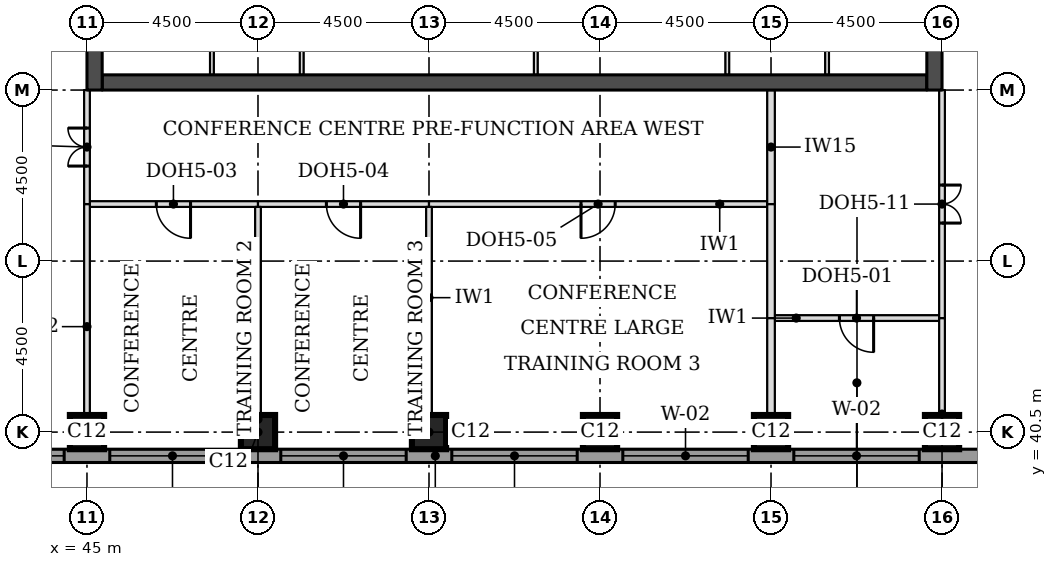
"""IFC4 building model, lengths in metres.
Left out: names, types, materials, properties, quantities, classifications, styles, units other than length and angle.
Written with IfcOpenShell. Run it as: python <this file> out.ifc"""

import sys

from ifc_helpers import new_model, si_unit, direction, frame, frame_2d, origin, origin_2d, place, context, subcontext, project, spatial, rectangle, extrude, element, fill, save


model = new_model("IFC4")
c1 = context("Model", 3, precision=1e-05, world=origin(), true_north=direction((0.0, 1.0)))
c2 = subcontext(c1, "Body", "Model", "MODEL_VIEW")
j1 = project(units=[si_unit("LENGTHUNIT", "METRE"), si_unit("PLANEANGLEUNIT", "RADIAN")], contexts=[c1])
p1 = place(None, origin())
s1 = spatial("IfcSite", under=j1, at=p1, CompositionType="ELEMENT")
p2 = place(p1, origin())
s2 = spatial("IfcBuilding", under=s1, at=p2, CompositionType="ELEMENT")
p3 = place(p2, frame((0.0, 0.0, 177.3)))
s3 = spatial("IfcBuildingStorey", under=s2, at=p3, CompositionType="ELEMENT", Elevation=177.3)
for number, where, z_axis, x_axis in (
    (1, (45.0, 40.5, 0.0), (0.0, 0.0, 1.0), (1.0, 0.0, 0.0)),
    (2, (49.5, 40.5, 0.0), (0.0, 0.0, 1.0), (1.0, 0.0, 0.0)),
    (3, (54.0, 40.5, 0.0), (0.0, 0.0, 1.0), (1.0, 0.0, 0.0)),
    (4, (58.5, 40.5, 0.0), (0.0, 0.0, 1.0), (1.0, 0.0, 0.0)),
    (5, (63.0, 40.5, 0.0), (0.0, 0.0, 1.0), (1.0, 0.0, 0.0)),
    (6, (67.5, 40.5, 0.0), (0.0, 0.0, 1.0), (1.0, 0.0, 0.0)),
):
    element("IfcColumn", number, at=place(p3, frame(where, z_axis=z_axis, x_axis=x_axis)), inside=s3, PredefinedType="COLUMN", context=c2, shape_type="SweptSolid", body=[
        extrude(rectangle(XDim=0.9, YDim=0.9, at=origin_2d()), origin(), (0.0, 0.0, 1.0), 3.7),
    ])
p4 = place(p3, frame((45.4, 49.7, 0.0), z_axis=(0.0, 0.0, 1.0), x_axis=(1.0, 0.0, 0.0)))
e7 = element("IfcWall", 7, at=p4, inside=s3, PredefinedType="SHEAR", context=c2, shape_type="SweptSolid", body=[
    extrude(rectangle(XDim=21.7, YDim=0.4, at=frame_2d((10.85, 0.0))), origin(), (0.0, 0.0, 1.0), 3.7),
])
p5 = place(p3, frame((45.2, 49.5, 0.0), z_axis=(0.0, 0.0, 1.0), x_axis=(0.0, 1.0, 0.0)))
e8 = element("IfcWall", 8, at=p5, inside=s3, PredefinedType="SHEAR", context=c2, shape_type="SweptSolid", body=[
    extrude(rectangle(XDim=22.5, YDim=0.4, at=frame_2d((11.25, 0.0))), origin(), (0.0, 0.0, 1.0), 3.7),
])
p6 = place(p5, frame((4.2, 0.0, 0.0)))
e9 = element("IfcOpeningElement", 9, at=p6, cuts=e8, PredefinedType="OPENING", context=c2, shape_type="SweptSolid", body=[
    extrude(rectangle(XDim=1.8, YDim=2.1, at=frame_2d((0.9, 1.05))), frame((0.0, 0.21, 0.0), z_axis=(0.0, -1.0, 0.0), x_axis=(1.0, 0.0, 0.0)), (0.0, 0.0, 1.0), 0.42),
])
p7 = place(p5, frame((6.9, 0.0, 0.0)))
e10 = element("IfcOpeningElement", 10, at=p7, cuts=e8, PredefinedType="OPENING", context=c2, shape_type="SweptSolid", body=[
    extrude(rectangle(XDim=1.1, YDim=2.1, at=frame_2d((0.55, 1.05))), frame((0.0, 0.21, 0.0), z_axis=(0.0, -1.0, 0.0), x_axis=(1.0, 0.0, 0.0)), (0.0, 0.0, 1.0), 0.42),
])
p8 = place(p5, frame((13.6, 0.0, 0.0)))
e11 = element("IfcOpeningElement", 11, at=p8, cuts=e8, PredefinedType="OPENING", context=c2, shape_type="SweptSolid", body=[
    extrude(rectangle(XDim=1.1, YDim=2.1, at=frame_2d((0.55, 1.05))), frame((0.0, 0.21, 0.0), z_axis=(0.0, -1.0, 0.0), x_axis=(1.0, 0.0, 0.0)), (0.0, 0.0, 1.0), 0.42),
])
p9 = place(p5, frame((16.5, 0.0, 0.0)))
e12 = element("IfcOpeningElement", 12, at=p9, cuts=e8, PredefinedType="OPENING", context=c2, shape_type="SweptSolid", body=[
    extrude(rectangle(XDim=1.8, YDim=2.1, at=frame_2d((0.9, 1.05))), frame((0.0, 0.21, 0.0), z_axis=(0.0, -1.0, 0.0), x_axis=(1.0, 0.0, 0.0)), (0.0, 0.0, 1.0), 0.42),
])
p10 = place(p3, frame((67.3, 49.5, 0.0), z_axis=(0.0, 0.0, 1.0), x_axis=(0.0, 1.0, 0.0)))
e13 = element("IfcWall", 13, at=p10, inside=s3, PredefinedType="SHEAR", context=c2, shape_type="SweptSolid", body=[
    extrude(rectangle(XDim=22.5, YDim=0.4, at=frame_2d((11.25, 0.0))), origin(), (0.0, 0.0, 1.0), 3.7),
])
p11 = place(p10, frame((4.2, 0.0, 0.0)))
e14 = element("IfcOpeningElement", 14, at=p11, cuts=e13, PredefinedType="OPENING", context=c2, shape_type="SweptSolid", body=[
    extrude(rectangle(XDim=1.8, YDim=2.1, at=frame_2d((0.9, 1.05))), frame((0.0, 0.21, 0.0), z_axis=(0.0, -1.0, 0.0), x_axis=(1.0, 0.0, 0.0)), (0.0, 0.0, 1.0), 0.42),
])
p12 = place(p10, frame((6.9, 0.0, 0.0)))
e15 = element("IfcOpeningElement", 15, at=p12, cuts=e13, PredefinedType="OPENING", context=c2, shape_type="SweptSolid", body=[
    extrude(rectangle(XDim=1.1, YDim=2.1, at=frame_2d((0.55, 1.05))), frame((0.0, 0.21, 0.0), z_axis=(0.0, -1.0, 0.0), x_axis=(1.0, 0.0, 0.0)), (0.0, 0.0, 1.0), 0.42),
])
p13 = place(p10, frame((13.6, 0.0, 0.0)))
e16 = element("IfcOpeningElement", 16, at=p13, cuts=e13, PredefinedType="OPENING", context=c2, shape_type="SweptSolid", body=[
    extrude(rectangle(XDim=1.1, YDim=2.1, at=frame_2d((0.55, 1.05))), frame((0.0, 0.21, 0.0), z_axis=(0.0, -1.0, 0.0), x_axis=(1.0, 0.0, 0.0)), (0.0, 0.0, 1.0), 0.42),
])
p14 = place(p10, frame((16.5, 0.0, 0.0)))
e17 = element("IfcOpeningElement", 17, at=p14, cuts=e13, PredefinedType="OPENING", context=c2, shape_type="SweptSolid", body=[
    extrude(rectangle(XDim=1.8, YDim=2.1, at=frame_2d((0.9, 1.05))), frame((0.0, 0.21, 0.0), z_axis=(0.0, -1.0, 0.0), x_axis=(1.0, 0.0, 0.0)), (0.0, 0.0, 1.0), 0.42),
])
p15 = place(p3, frame((36.0, 39.875, 0.0), z_axis=(0.0, 0.0, 1.0), x_axis=(1.0, 0.0, 0.0)))
e18 = element("IfcWall", 18, at=p15, inside=s3, PredefinedType="STANDARD", context=c2, shape_type="SweptSolid", body=[
    extrude(rectangle(XDim=36.331, YDim=0.35, at=frame_2d((18.166, 0.0))), origin(), (0.0, 0.0, 1.0), 3.525),
])
p16 = place(p15, frame((5.1, 0.0, 0.9)))
e19 = element("IfcOpeningElement", 19, at=p16, cuts=e18, PredefinedType="OPENING", context=c2, shape_type="SweptSolid", body=[
    extrude(rectangle(XDim=3.3, YDim=1.9, at=frame_2d((1.65, 0.95))), frame((0.0, 0.185, 0.0), z_axis=(0.0, -1.0, 0.0), x_axis=(1.0, 0.0, 0.0)), (0.0, 0.0, 1.0), 0.37),
])
p17 = place(p15, frame((9.6, 0.0, 0.9)))
e20 = element("IfcOpeningElement", 20, at=p17, cuts=e18, PredefinedType="OPENING", context=c2, shape_type="SweptSolid", body=[
    extrude(rectangle(XDim=3.3, YDim=1.9, at=frame_2d((1.65, 0.95))), frame((0.0, 0.185, 0.0), z_axis=(0.0, -1.0, 0.0), x_axis=(1.0, 0.0, 0.0)), (0.0, 0.0, 1.0), 0.37),
])
p18 = place(p15, frame((14.1, 0.0, 0.9)))
e21 = element("IfcOpeningElement", 21, at=p18, cuts=e18, PredefinedType="OPENING", context=c2, shape_type="SweptSolid", body=[
    extrude(rectangle(XDim=3.3, YDim=1.9, at=frame_2d((1.65, 0.95))), frame((0.0, 0.185, 0.0), z_axis=(0.0, -1.0, 0.0), x_axis=(1.0, 0.0, 0.0)), (0.0, 0.0, 1.0), 0.37),
])
p19 = place(p15, frame((18.6, 0.0, 0.9)))
e22 = element("IfcOpeningElement", 22, at=p19, cuts=e18, PredefinedType="OPENING", context=c2, shape_type="SweptSolid", body=[
    extrude(rectangle(XDim=3.3, YDim=1.9, at=frame_2d((1.65, 0.95))), frame((0.0, 0.185, 0.0), z_axis=(0.0, -1.0, 0.0), x_axis=(1.0, 0.0, 0.0)), (0.0, 0.0, 1.0), 0.37),
])
p20 = place(p15, frame((23.1, 0.0, 0.9)))
e23 = element("IfcOpeningElement", 23, at=p20, cuts=e18, PredefinedType="OPENING", context=c2, shape_type="SweptSolid", body=[
    extrude(rectangle(XDim=3.3, YDim=1.9, at=frame_2d((1.65, 0.95))), frame((0.0, 0.185, 0.0), z_axis=(0.0, -1.0, 0.0), x_axis=(1.0, 0.0, 0.0)), (0.0, 0.0, 1.0), 0.37),
])
p21 = place(p15, frame((27.6, 0.0, 0.9)))
e24 = element("IfcOpeningElement", 24, at=p21, cuts=e18, PredefinedType="OPENING", context=c2, shape_type="SweptSolid", body=[
    extrude(rectangle(XDim=3.3, YDim=1.9, at=frame_2d((1.65, 0.95))), frame((0.0, 0.185, 0.0), z_axis=(0.0, -1.0, 0.0), x_axis=(1.0, 0.0, 0.0)), (0.0, 0.0, 1.0), 0.37),
])
p22 = place(p3, frame((63.1, 43.5, 0.0), z_axis=(0.0, 0.0, 1.0), x_axis=(1.0, 0.0, 0.0)))
e25 = element("IfcWall", 25, at=p22, inside=s3, PredefinedType="PARTITIONING", context=c2, shape_type="SweptSolid", body=[
    extrude(rectangle(XDim=4.325, YDim=0.15, at=frame_2d((2.163, 0.0))), origin(), (0.0, 0.0, 1.0), 3.55),
])
p23 = place(p22, frame((1.7, 0.0, 0.0)))
e26 = element("IfcOpeningElement", 26, at=p23, cuts=e25, PredefinedType="OPENING", context=c2, shape_type="SweptSolid", body=[
    extrude(rectangle(XDim=0.9, YDim=2.1, at=frame_2d((0.45, 1.05))), frame((0.0, 0.085, 0.0), z_axis=(0.0, -1.0, 0.0), x_axis=(1.0, 0.0, 0.0)), (0.0, 0.0, 1.0), 0.17),
])
p24 = place(p3, frame((45.075, 46.5, 0.0), z_axis=(0.0, 0.0, 1.0), x_axis=(1.0, 0.0, 0.0)))
e27 = element("IfcWall", 27, at=p24, inside=s3, PredefinedType="PARTITIONING", context=c2, shape_type="SweptSolid", body=[
    extrude(rectangle(XDim=4.425, YDim=0.15, at=frame_2d((2.212, 0.0))), origin(), (0.0, 0.0, 1.0), 3.55),
])
p25 = place(p24, frame((1.75, 0.0, 0.0)))
e28 = element("IfcOpeningElement", 28, at=p25, cuts=e27, PredefinedType="OPENING", context=c2, shape_type="SweptSolid", body=[
    extrude(rectangle(XDim=0.9, YDim=2.1, at=frame_2d((0.45, 1.05))), frame((0.0, 0.085, 0.0), z_axis=(0.0, -1.0, 0.0), x_axis=(1.0, 0.0, 0.0)), (0.0, 0.0, 1.0), 0.17),
])
p26 = place(p3, frame((49.5, 46.5, 0.0), z_axis=(0.0, 0.0, 1.0), x_axis=(1.0, 0.0, 0.0)))
e29 = element("IfcWall", 29, at=p26, inside=s3, PredefinedType="PARTITIONING", context=c2, shape_type="SweptSolid", body=[
    extrude(rectangle(XDim=4.5, YDim=0.15, at=frame_2d((2.25, 0.0))), origin(), (0.0, 0.0, 1.0), 3.55),
])
p27 = place(p26, frame((1.8, 0.0, 0.0)))
e30 = element("IfcOpeningElement", 30, at=p27, cuts=e29, PredefinedType="OPENING", context=c2, shape_type="SweptSolid", body=[
    extrude(rectangle(XDim=0.9, YDim=2.1, at=frame_2d((0.45, 1.05))), frame((0.0, 0.085, 0.0), z_axis=(0.0, -1.0, 0.0), x_axis=(1.0, 0.0, 0.0)), (0.0, 0.0, 1.0), 0.17),
])
p28 = place(p3, frame((54.0, 46.5, 0.0), z_axis=(0.0, 0.0, 1.0), x_axis=(1.0, 0.0, 0.0)))
e31 = element("IfcWall", 31, at=p28, inside=s3, PredefinedType="PARTITIONING", context=c2, shape_type="SweptSolid", body=[
    extrude(rectangle(XDim=8.9, YDim=0.15, at=frame_2d((4.45, 0.0))), origin(), (0.0, 0.0, 1.0), 3.55),
])
p29 = place(p28, frame((4.0, 0.0, 0.0)))
e32 = element("IfcOpeningElement", 32, at=p29, cuts=e31, PredefinedType="OPENING", context=c2, shape_type="SweptSolid", body=[
    extrude(rectangle(XDim=0.9, YDim=2.1, at=frame_2d((0.45, 1.05))), frame((0.0, 0.085, 0.0), z_axis=(0.0, -1.0, 0.0), x_axis=(1.0, 0.0, 0.0)), (0.0, 0.0, 1.0), 0.17),
])
p30 = place(p3, frame((45.0, 40.05, 0.0), z_axis=(0.0, 0.0, 1.0), x_axis=(0.0, 1.0, 0.0)))
e33 = element("IfcWall", 33, at=p30, inside=s3, PredefinedType="PARTITIONING", context=c2, shape_type="SweptSolid", body=[
    extrude(rectangle(XDim=6.45, YDim=0.15, at=frame_2d((3.225, 0.0))), origin(), (0.0, 0.0, 1.0), 3.022),
])
for number, where, z_axis, x_axis in (
    (34, (49.5, 40.05, 0.0), (0.0, 0.0, 1.0), (0.0, 1.0, 0.0)),
    (35, (54.0, 40.05, 0.0), (0.0, 0.0, 1.0), (0.0, 1.0, 0.0)),
):
    element("IfcWall", number, at=place(p3, frame(where, z_axis=z_axis, x_axis=x_axis)), inside=s3, PredefinedType="PARTITIONING", context=c2, shape_type="SweptSolid", body=[
        extrude(rectangle(XDim=6.375, YDim=0.15, at=frame_2d((3.188, 0.0))), origin(), (0.0, 0.0, 1.0), 3.55),
    ])
p31 = place(p3, frame((63.0, 40.05, 0.0), z_axis=(0.0, 0.0, 1.0), x_axis=(0.0, 1.0, 0.0)))
e36 = element("IfcWall", 36, at=p31, inside=s3, PredefinedType="PARTITIONING", context=c2, shape_type="SweptSolid", body=[
    extrude(rectangle(XDim=3.45, YDim=0.2, at=frame_2d((1.725, 0.0))), origin(), (0.0, 0.0, 1.0), 3.55),
])
p32 = place(p3, frame((67.5, 40.05, 0.0), z_axis=(0.0, 0.0, 1.0), x_axis=(0.0, 1.0, 0.0)))
e37 = element("IfcWall", 37, at=p32, inside=s3, PredefinedType="PARTITIONING", context=c2, shape_type="SweptSolid", body=[
    extrude(rectangle(XDim=3.45, YDim=0.15, at=frame_2d((1.725, 0.0))), origin(), (0.0, 0.0, 1.0), 3.022),
])
p33 = place(p3, frame((63.0, 43.5, 0.0), z_axis=(0.0, 0.0, 1.0), x_axis=(0.0, 1.0, 0.0)))
e38 = element("IfcWall", 38, at=p33, inside=s3, PredefinedType="PARTITIONING", context=c2, shape_type="SweptSolid", body=[
    extrude(rectangle(XDim=3.0, YDim=0.2, at=frame_2d((1.5, 0.0))), origin(), (0.0, 0.0, 1.0), 3.55),
])
p34 = place(p3, frame((67.5, 43.5, 0.0), z_axis=(0.0, 0.0, 1.0), x_axis=(0.0, 1.0, 0.0)))
e39 = element("IfcWall", 39, at=p34, inside=s3, PredefinedType="PARTITIONING", context=c2, shape_type="SweptSolid", body=[
    extrude(rectangle(XDim=6.0, YDim=0.15, at=frame_2d((3.0, 0.0))), origin(), (0.0, 0.0, 1.0), 3.022),
])
p35 = place(p34, frame((2.5, 0.0, 0.0)))
e40 = element("IfcOpeningElement", 40, at=p35, cuts=e39, PredefinedType="OPENING", context=c2, shape_type="SweptSolid", body=[
    extrude(rectangle(XDim=1.0, YDim=2.1, at=frame_2d((0.5, 1.05))), frame((0.0, 0.085, 0.0), z_axis=(0.0, -1.0, 0.0), x_axis=(1.0, 0.0, 0.0)), (0.0, 0.0, 1.0), 0.17),
])
p36 = place(p3, frame((45.0, 46.5, 0.0), z_axis=(0.0, 0.0, 1.0), x_axis=(0.0, 1.0, 0.0)))
e41 = element("IfcWall", 41, at=p36, inside=s3, PredefinedType="PARTITIONING", context=c2, shape_type="SweptSolid", body=[
    extrude(rectangle(XDim=3.0, YDim=0.15, at=frame_2d((1.5, 0.0))), origin(), (0.0, 0.0, 1.0), 3.022),
])
p37 = place(p36, frame((1.0, 0.0, 0.0)))
e42 = element("IfcOpeningElement", 42, at=p37, cuts=e41, PredefinedType="OPENING", context=c2, shape_type="SweptSolid", body=[
    extrude(rectangle(XDim=1.0, YDim=2.1, at=frame_2d((0.5, 1.05))), frame((0.0, 0.085, 0.0), z_axis=(0.0, -1.0, 0.0), x_axis=(1.0, 0.0, 0.0)), (0.0, 0.0, 1.0), 0.17),
])
p38 = place(p3, frame((63.0, 46.5, 0.0), z_axis=(0.0, 0.0, 1.0), x_axis=(0.0, 1.0, 0.0)))
e43 = element("IfcWall", 43, at=p38, inside=s3, PredefinedType="PARTITIONING", context=c2, shape_type="SweptSolid", body=[
    extrude(rectangle(XDim=3.0, YDim=0.2, at=frame_2d((1.5, 0.0))), origin(), (0.0, 0.0, 1.0), 3.55),
])
for number, where, z_axis, x_axis in (
    (44, (48.288, 49.9, 0.0), (0.0, 0.0, 1.0), (0.0, 1.0, 0.0)),
    (45, (50.65, 49.9, 0.0), (0.0, 0.0, 1.0), (0.0, 1.0, 0.0)),
    (46, (56.81, 49.9, 0.0), (0.0, 0.0, 1.0), (0.0, 1.0, 0.0)),
    (47, (61.85, 49.9, 0.0), (0.0, 0.0, 1.0), (0.0, 1.0, 0.0)),
    (48, (64.475, 49.9, 0.0), (0.0, 0.0, 1.0), (0.0, 1.0, 0.0)),
):
    element("IfcWall", number, at=place(p3, frame(where, z_axis=z_axis, x_axis=x_axis)), inside=s3, PredefinedType="PARTITIONING", context=c2, shape_type="SweptSolid", body=[
        extrude(rectangle(XDim=3.1, YDim=0.1, at=frame_2d((1.55, 0.0))), origin(), (0.0, 0.0, 1.0), 3.55),
    ])
p39 = place(p16, origin())
e49 = element("IfcWindow", 49, at=p39, inside=s3, PartitioningType="SINGLE_PANEL", PredefinedType="WINDOW", context=c2, shape_type="SweptSolid", body=[
    extrude(rectangle(XDim=3.3, YDim=1.9, at=frame_2d((1.65, 0.95))), frame((0.0, 0.085, 0.0), z_axis=(0.0, -1.0, 0.0), x_axis=(1.0, 0.0, 0.0)), (0.0, 0.0, 1.0), 0.06),
])
fill(e19, e49)
p40 = place(p17, origin())
e50 = element("IfcWindow", 50, at=p40, inside=s3, PartitioningType="SINGLE_PANEL", PredefinedType="WINDOW", context=c2, shape_type="SweptSolid", body=[
    extrude(rectangle(XDim=3.3, YDim=1.9, at=frame_2d((1.65, 0.95))), frame((0.0, 0.085, 0.0), z_axis=(0.0, -1.0, 0.0), x_axis=(1.0, 0.0, 0.0)), (0.0, 0.0, 1.0), 0.06),
])
fill(e20, e50)
p41 = place(p18, origin())
e51 = element("IfcWindow", 51, at=p41, inside=s3, PartitioningType="SINGLE_PANEL", PredefinedType="WINDOW", context=c2, shape_type="SweptSolid", body=[
    extrude(rectangle(XDim=3.3, YDim=1.9, at=frame_2d((1.65, 0.95))), frame((0.0, 0.085, 0.0), z_axis=(0.0, -1.0, 0.0), x_axis=(1.0, 0.0, 0.0)), (0.0, 0.0, 1.0), 0.06),
])
fill(e21, e51)
p42 = place(p19, origin())
e52 = element("IfcWindow", 52, at=p42, inside=s3, PartitioningType="SINGLE_PANEL", PredefinedType="WINDOW", context=c2, shape_type="SweptSolid", body=[
    extrude(rectangle(XDim=3.3, YDim=1.9, at=frame_2d((1.65, 0.95))), frame((0.0, 0.085, 0.0), z_axis=(0.0, -1.0, 0.0), x_axis=(1.0, 0.0, 0.0)), (0.0, 0.0, 1.0), 0.06),
])
fill(e22, e52)
p43 = place(p20, origin())
e53 = element("IfcWindow", 53, at=p43, inside=s3, PartitioningType="SINGLE_PANEL", PredefinedType="WINDOW", context=c2, shape_type="SweptSolid", body=[
    extrude(rectangle(XDim=3.3, YDim=1.9, at=frame_2d((1.65, 0.95))), frame((0.0, 0.085, 0.0), z_axis=(0.0, -1.0, 0.0), x_axis=(1.0, 0.0, 0.0)), (0.0, 0.0, 1.0), 0.06),
])
fill(e23, e53)
p44 = place(p21, origin())
e54 = element("IfcWindow", 54, at=p44, inside=s3, PartitioningType="SINGLE_PANEL", PredefinedType="WINDOW", context=c2, shape_type="SweptSolid", body=[
    extrude(rectangle(XDim=3.3, YDim=1.9, at=frame_2d((1.65, 0.95))), frame((0.0, 0.085, 0.0), z_axis=(0.0, -1.0, 0.0), x_axis=(1.0, 0.0, 0.0)), (0.0, 0.0, 1.0), 0.06),
])
fill(e24, e54)
p45 = place(p37, origin())
e55 = element("IfcDoor", 55, at=p45, inside=s3, OperationType="DOUBLE_DOOR_SINGLE_SWING", PredefinedType="DOOR", context=c2, shape_type="SweptSolid", body=[
    extrude(rectangle(XDim=1.0, YDim=2.1, at=frame_2d((0.5, 1.05))), frame((0.0, 0.025, 0.0), z_axis=(0.0, -1.0, 0.0), x_axis=(1.0, 0.0, 0.0)), (0.0, 0.0, 1.0), 0.05),
])
fill(e42, e55)
p46 = place(p25, frame((0.9, 0.0, 0.0), z_axis=(0.0, 0.0, 1.0), x_axis=(-1.0, 0.0, 0.0)))
e56 = element("IfcDoor", 56, at=p46, inside=s3, OperationType="SINGLE_SWING_LEFT", PredefinedType="DOOR", context=c2, shape_type="SweptSolid", body=[
    extrude(rectangle(XDim=0.9, YDim=2.1, at=frame_2d((0.45, 1.05))), frame((0.0, 0.025, 0.0), z_axis=(0.0, -1.0, 0.0), x_axis=(1.0, 0.0, 0.0)), (0.0, 0.0, 1.0), 0.05),
])
fill(e28, e56)
p47 = place(p27, frame((0.9, 0.0, 0.0), z_axis=(0.0, 0.0, 1.0), x_axis=(-1.0, 0.0, 0.0)))
e57 = element("IfcDoor", 57, at=p47, inside=s3, OperationType="SINGLE_SWING_LEFT", PredefinedType="DOOR", context=c2, shape_type="SweptSolid", body=[
    extrude(rectangle(XDim=0.9, YDim=2.1, at=frame_2d((0.45, 1.05))), frame((0.0, 0.025, 0.0), z_axis=(0.0, -1.0, 0.0), x_axis=(1.0, 0.0, 0.0)), (0.0, 0.0, 1.0), 0.05),
])
fill(e30, e57)
p48 = place(p29, frame((0.9, 0.0, 0.0), z_axis=(0.0, 0.0, 1.0), x_axis=(-1.0, 0.0, 0.0)))
e58 = element("IfcDoor", 58, at=p48, inside=s3, OperationType="SINGLE_SWING_RIGHT", PredefinedType="DOOR", context=c2, shape_type="SweptSolid", body=[
    extrude(rectangle(XDim=0.9, YDim=2.1, at=frame_2d((0.45, 1.05))), frame((0.0, 0.025, 0.0), z_axis=(0.0, -1.0, 0.0), x_axis=(1.0, 0.0, 0.0)), (0.0, 0.0, 1.0), 0.05),
])
fill(e32, e58)
p49 = place(p35, frame((1.0, 0.0, 0.0), z_axis=(0.0, 0.0, 1.0), x_axis=(-1.0, 0.0, 0.0)))
e59 = element("IfcDoor", 59, at=p49, inside=s3, OperationType="DOUBLE_DOOR_SINGLE_SWING", PredefinedType="DOOR", context=c2, shape_type="SweptSolid", body=[
    extrude(rectangle(XDim=1.0, YDim=2.1, at=frame_2d((0.5, 1.05))), frame((0.0, 0.025, 0.0), z_axis=(0.0, -1.0, 0.0), x_axis=(1.0, 0.0, 0.0)), (0.0, 0.0, 1.0), 0.05),
])
fill(e40, e59)
p50 = place(p23, frame((0.9, 0.0, 0.0), z_axis=(0.0, 0.0, 1.0), x_axis=(-1.0, 0.0, 0.0)))
e60 = element("IfcDoor", 60, at=p50, inside=s3, OperationType="SINGLE_SWING_LEFT", PredefinedType="DOOR", context=c2, shape_type="SweptSolid", body=[
    extrude(rectangle(XDim=0.9, YDim=2.1, at=frame_2d((0.45, 1.05))), frame((0.0, 0.025, 0.0), z_axis=(0.0, -1.0, 0.0), x_axis=(1.0, 0.0, 0.0)), (0.0, 0.0, 1.0), 0.05),
])
fill(e26, e60)
save(model, sys.argv[1])
